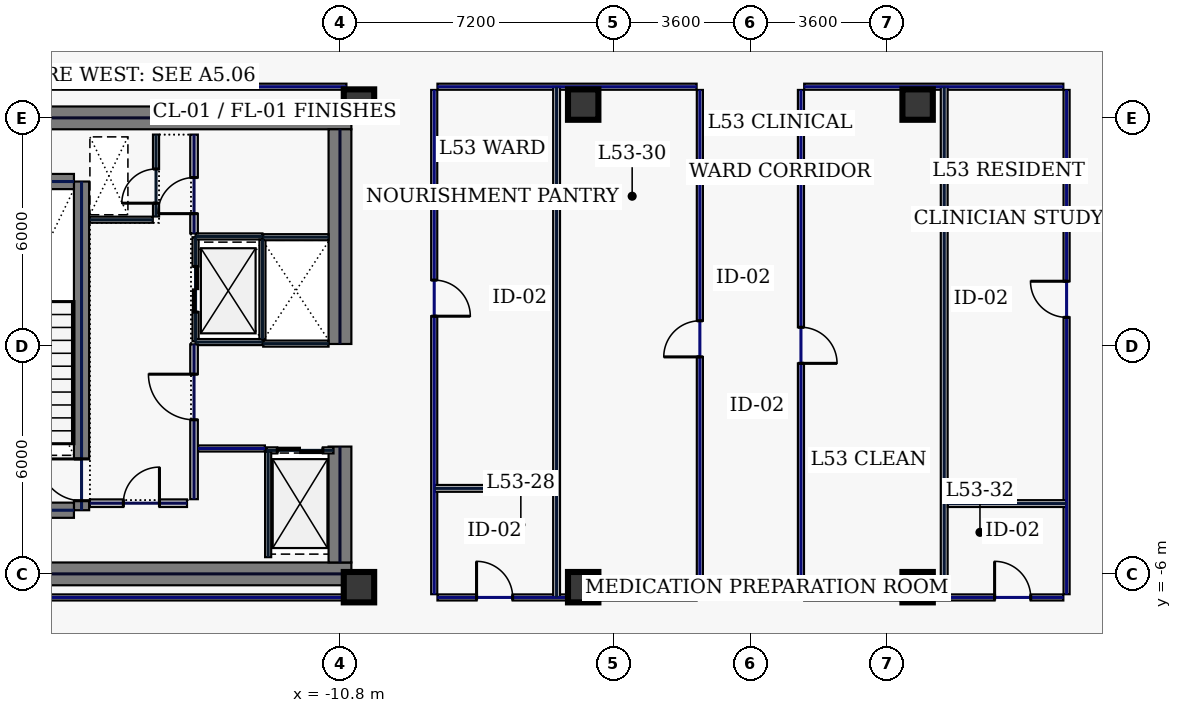
"""IFC4 building model, lengths in metres.
Left out: names, types, materials, properties, quantities, classifications, styles, units other than length and angle.
Written with IfcOpenShell. Run it as: python <this file> out.ifc"""

import sys

from ifc_helpers import new_model, si_unit, direction, frame, frame_2d, origin, origin_2d, place, context, subcontext, project, spatial, rectangle, hollow_rectangle, extrude, element, fill, save


model = new_model("IFC4")
c1 = context("Model", 3, precision=1e-05, world=origin(), true_north=direction((0.0, 1.0)))
c2 = subcontext(c1, "Body", "Model", "MODEL_VIEW")
j1 = project(units=[si_unit("LENGTHUNIT", "METRE"), si_unit("PLANEANGLEUNIT", "RADIAN")], contexts=[c1])
p1 = place(None, origin())
s1 = spatial("IfcSite", under=j1, at=p1, CompositionType="ELEMENT")
p2 = place(p1, origin())
s2 = spatial("IfcBuilding", under=s1, at=p2, CompositionType="ELEMENT")
p3 = place(p2, frame((0.0, 0.0, 230.2)))
s3 = spatial("IfcBuildingStorey", under=s2, at=p3, CompositionType="ELEMENT", Elevation=230.2)
for number, where, z_axis, x_axis in (
    (1, (-22.0, 6.0, 0.0), (0.0, 0.0, 1.0), (1.0, 0.0, 0.0)),
    (2, (-22.0, -6.0, 0.0), (0.0, 0.0, 1.0), (1.0, 0.0, 0.0)),
):
    element("IfcWall", number, at=place(p3, frame(where, z_axis=z_axis, x_axis=x_axis)), inside=s3, PredefinedType="SHEAR", context=c2, shape_type="SweptSolid", body=[
        extrude(rectangle(XDim=11.5, YDim=0.6, at=frame_2d((5.75, 0.0))), origin(), (0.0, 0.0, 1.0), 3.74),
    ])
p4 = place(p3, frame((-10.8, -5.7, 0.0), z_axis=(0.0, 0.0, 1.0), x_axis=(0.0, 1.0, 0.0)))
e3 = element("IfcWall", 3, at=p4, inside=s3, PredefinedType="SHEAR", context=c2, shape_type="SweptSolid", body=[
    extrude(rectangle(XDim=3.05, YDim=0.6, at=frame_2d((1.525, 0.0))), origin(), (0.0, 0.0, 1.0), 3.74),
])
p5 = place(p3, frame((-10.8, 0.05, 0.0), z_axis=(0.0, 0.0, 1.0), x_axis=(0.0, 1.0, 0.0)))
e4 = element("IfcWall", 4, at=p5, inside=s3, PredefinedType="SHEAR", context=c2, shape_type="SweptSolid", body=[
    extrude(rectangle(XDim=5.65, YDim=0.6, at=frame_2d((2.825, 0.0))), origin(), (0.0, 0.0, 1.0), 3.74),
])
p6 = place(p3, frame((-17.6, -4.325, 0.0), z_axis=(0.0, 0.0, 1.0), x_axis=(0.0, 1.0, 0.0)))
e5 = element("IfcWall", 5, at=p6, inside=s3, PredefinedType="SHEAR", context=c2, shape_type="SweptSolid", body=[
    extrude(rectangle(XDim=8.65, YDim=0.4, at=frame_2d((4.325, 0.0))), origin(), (0.0, 0.0, 1.0), 3.74),
])
p7 = place(p6, frame((0.25, 0.0, 0.0)))
e6 = element("IfcOpeningElement", 6, at=p7, cuts=e5, PredefinedType="OPENING", context=c2, shape_type="SweptSolid", body=[
    extrude(rectangle(XDim=1.1, YDim=2.2, at=frame_2d((0.55, 1.1))), frame((0.0, 0.21, 0.0), z_axis=(0.0, -1.0, 0.0), x_axis=(1.0, 0.0, 0.0)), (0.0, 0.0, 1.0), 0.42),
])
for number, where, z_axis, x_axis in (
    (7, (-21.2, -4.325, 0.0), (0.0, 0.0, 1.0), (1.0, 0.0, 0.0)),
    (8, (-21.2, 4.325, 0.0), (0.0, 0.0, 1.0), (1.0, 0.0, 0.0)),
):
    element("IfcWall", number, at=place(p3, frame(where, z_axis=z_axis, x_axis=x_axis)), inside=s3, PredefinedType="SHEAR", context=c2, shape_type="SweptSolid", body=[
        extrude(rectangle(XDim=3.4, YDim=0.4, at=frame_2d((1.7, 0.0))), origin(), (0.0, 0.0, 1.0), 3.74),
    ])
for number, where, z_axis, x_axis in (
    (9, (-10.3, -6.35, 0.0), (0.0, 0.0, 1.0), (1.0, 0.0, 0.0)),
    (10, (-10.3, 6.35, 0.0), (0.0, 0.0, 1.0), (1.0, 0.0, 0.0)),
    (11, (-4.4, -6.35, 0.0), (0.0, 0.0, 1.0), (1.0, 0.0, 0.0)),
    (12, (4.4, -6.35, 0.0), (0.0, 0.0, 1.0), (1.0, 0.0, 0.0)),
    (13, (-4.4, 6.35, 0.0), (0.0, 0.0, 1.0), (1.0, 0.0, 0.0)),
    (14, (4.4, 6.35, 0.0), (0.0, 0.0, 1.0), (1.0, 0.0, 0.0)),
):
    element("IfcColumn", number, at=place(p3, frame(where, z_axis=z_axis, x_axis=x_axis)), inside=s3, PredefinedType="COLUMN", context=c2, shape_type="SweptSolid", body=[
        extrude(hollow_rectangle(XDim=0.8, YDim=0.8, WallThickness=0.036, at=origin_2d()), origin(), (0.0, 0.0, 1.0), 3.74),
    ])
p8 = place(p3, frame((-14.6, 0.12, 0.0), z_axis=(0.0, 0.0, 1.0), x_axis=(0.0, 1.0, 0.0)))
e15 = element("IfcWall", 15, at=p8, inside=s3, PredefinedType="PARTITIONING", context=c2, shape_type="SweptSolid", body=[
    extrude(rectangle(XDim=2.74, YDim=0.16, at=frame_2d((1.37, 0.0))), origin(), (0.0, 0.0, 1.0), 3.74),
])
p9 = place(p8, frame((0.77, 0.0, 0.0)))
e16 = element("IfcOpeningElement", 16, at=p9, cuts=e15, PredefinedType="OPENING", context=c2, shape_type="SweptSolid", body=[
    extrude(rectangle(XDim=1.2, YDim=2.2, at=frame_2d((0.6, 1.1))), frame((0.0, 0.09, 0.0), z_axis=(0.0, -1.0, 0.0), x_axis=(1.0, 0.0, 0.0)), (0.0, 0.0, 1.0), 0.18),
])
for number, where, z_axis, x_axis in (
    (17, (-14.6, 0.1, 0.0), (0.0, 0.0, 1.0), (1.0, 0.0, 0.0)),
    (18, (-14.6, 2.88, 0.0), (0.0, 0.0, 1.0), (1.0, 0.0, 0.0)),
):
    element("IfcWall", number, at=place(p3, frame(where, z_axis=z_axis, x_axis=x_axis)), inside=s3, PredefinedType="PARTITIONING", context=c2, shape_type="SweptSolid", body=[
        extrude(rectangle(XDim=1.76, YDim=0.16, at=frame_2d((0.88, 0.0))), origin(), (0.0, 0.0, 1.0), 3.74),
    ])
p10 = place(p3, frame((-12.84, 0.18, 0.0), z_axis=(0.0, 0.0, 1.0), x_axis=(0.0, 1.0, 0.0)))
e19 = element("IfcWall", 19, at=p10, inside=s3, PredefinedType="PARTITIONING", context=c2, shape_type="SweptSolid", body=[
    extrude(rectangle(XDim=2.62, YDim=0.16, at=frame_2d((1.31, 0.0))), origin(), (0.0, 0.0, 1.0), 3.74),
])
p11 = place(p3, frame((-12.73, -2.75, 0.0), z_axis=(0.0, 0.0, 1.0), x_axis=(1.0, 0.0, 0.0)))
e20 = element("IfcWall", 20, at=p11, inside=s3, PredefinedType="PARTITIONING", context=c2, shape_type="SweptSolid", body=[
    extrude(rectangle(XDim=1.76, YDim=0.16, at=frame_2d((0.88, 0.0))), origin(), (0.0, 0.0, 1.0), 3.74),
])
p12 = place(p11, frame((0.28, 0.0, 0.0)))
e21 = element("IfcOpeningElement", 21, at=p12, cuts=e20, PredefinedType="OPENING", context=c2, shape_type="SweptSolid", body=[
    extrude(rectangle(XDim=1.2, YDim=2.2, at=frame_2d((0.6, 1.1))), frame((0.0, 0.09, 0.0), z_axis=(0.0, -1.0, 0.0), x_axis=(1.0, 0.0, 0.0)), (0.0, 0.0, 1.0), 0.18),
])
for number, where, z_axis, x_axis in (
    (22, (-12.82, 0.06, 0.0), (0.0, 0.0, 1.0), (1.0, 0.0, 0.0)),
    (23, (-12.82, 2.86, 0.0), (0.0, 0.0, 1.0), (1.0, 0.0, 0.0)),
):
    element("IfcWall", number, at=place(p3, frame(where, z_axis=z_axis, x_axis=x_axis)), inside=s3, PredefinedType="PARTITIONING", context=c2, shape_type="SweptSolid", body=[
        extrude(rectangle(XDim=1.72, YDim=0.16, at=frame_2d((0.86, 0.0))), origin(), (0.0, 0.0, 1.0), 3.74),
    ])
p13 = place(p3, frame((-15.64, 3.405, 0.0), z_axis=(0.0, 0.0, 1.0), x_axis=(0.0, 1.0, 0.0)))
e24 = element("IfcWall", 24, at=p13, inside=s3, PredefinedType="PARTITIONING", context=c2, shape_type="SweptSolid", body=[
    extrude(rectangle(XDim=2.155, YDim=0.16, at=frame_2d((1.078, 0.0))), origin(), (0.0, 0.0, 1.0), 3.74),
])
p14 = place(p13, frame((0.35, 0.0, 0.0)))
e25 = element("IfcOpeningElement", 25, at=p14, cuts=e24, PredefinedType="OPENING", context=c2, shape_type="SweptSolid", body=[
    extrude(rectangle(XDim=0.9, YDim=2.2, at=frame_2d((0.45, 1.1))), frame((0.0, 0.09, 0.0), z_axis=(0.0, -1.0, 0.0), x_axis=(1.0, 0.0, 0.0)), (0.0, 0.0, 1.0), 0.18),
])
p15 = place(p3, frame((-17.38, 3.32, 0.0), z_axis=(0.0, 0.0, 1.0), x_axis=(1.0, 0.0, 0.0)))
e26 = element("IfcWall", 26, at=p15, inside=s3, PredefinedType="PARTITIONING", context=c2, shape_type="SweptSolid", body=[
    extrude(rectangle(XDim=1.655, YDim=0.16, at=frame_2d((0.827, 0.0))), origin(), (0.0, 0.0, 1.0), 3.74),
])
p16 = place(p3, frame((-17.38, -4.14, 0.0), z_axis=(0.0, 0.0, 1.0), x_axis=(1.0, 0.0, 0.0)))
e27 = element("IfcWall", 27, at=p16, inside=s3, PredefinedType="SOLIDWALL", context=c2, shape_type="SweptSolid", body=[
    extrude(rectangle(XDim=2.555, YDim=0.2, at=frame_2d((1.277, 0.0))), origin(), (0.0, 0.0, 1.0), 3.74),
])
p17 = place(p16, frame((0.88, 0.0, 0.0)))
e28 = element("IfcOpeningElement", 28, at=p17, cuts=e27, PredefinedType="OPENING", context=c2, shape_type="SweptSolid", body=[
    extrude(rectangle(XDim=0.95, YDim=2.2, at=frame_2d((0.475, 1.1))), frame((0.0, 0.11, 0.0), z_axis=(0.0, -1.0, 0.0), x_axis=(1.0, 0.0, 0.0)), (0.0, 0.0, 1.0), 0.22),
])
p18 = place(p3, frame((-14.535, -2.7, 0.0), z_axis=(0.0, 0.0, 1.0), x_axis=(1.0, 0.0, 0.0)))
e29 = element("IfcWall", 29, at=p18, inside=s3, PredefinedType="PARTITIONING", context=c2, shape_type="SweptSolid", body=[
    extrude(rectangle(XDim=1.76, YDim=0.16, at=frame_2d((0.88, 0.0))), origin(), (0.0, 0.0, 1.0), 3.74),
])
p19 = place(p3, frame((-12.69, -5.56, 0.0), z_axis=(0.0, 0.0, 1.0), x_axis=(0.0, 1.0, 0.0)))
e30 = element("IfcWall", 30, at=p19, inside=s3, PredefinedType="PARTITIONING", context=c2, shape_type="SweptSolid", body=[
    extrude(rectangle(XDim=2.775, YDim=0.16, at=frame_2d((1.388, 0.0))), origin(), (0.0, 0.0, 1.0), 3.74),
])
p20 = place(p3, frame((-14.64, 2.96, 0.0), z_axis=(0.0, 0.0, 1.0), x_axis=(0.0, 1.0, 0.0)))
e31 = element("IfcWall", 31, at=p20, inside=s3, PredefinedType="SOLIDWALL", context=c2, shape_type="SweptSolid", body=[
    extrude(rectangle(XDim=2.6, YDim=0.2, at=frame_2d((1.3, 0.0))), origin(), (0.0, 0.0, 1.0), 3.74),
])
p21 = place(p20, frame((0.52, 0.0, 0.0)))
e32 = element("IfcOpeningElement", 32, at=p21, cuts=e31, PredefinedType="OPENING", context=c2, shape_type="SweptSolid", body=[
    extrude(rectangle(XDim=0.95, YDim=2.2, at=frame_2d((0.475, 1.1))), frame((0.0, 0.11, 0.0), z_axis=(0.0, -1.0, 0.0), x_axis=(1.0, 0.0, 0.0)), (0.0, 0.0, 1.0), 0.22),
])
p22 = place(p3, frame((-14.64, -4.035, 0.0), z_axis=(0.0, 0.0, 1.0), x_axis=(0.0, 1.0, 0.0)))
e33 = element("IfcWall", 33, at=p22, inside=s3, PredefinedType="SOLIDWALL", context=c2, shape_type="SweptSolid", body=[
    extrude(rectangle(XDim=4.075, YDim=0.2, at=frame_2d((2.038, 0.0))), origin(), (0.0, 0.0, 1.0), 3.74),
])
p23 = place(p22, frame((2.09, 0.0, 0.0)))
e34 = element("IfcOpeningElement", 34, at=p23, cuts=e33, PredefinedType="OPENING", context=c2, shape_type="SweptSolid", body=[
    extrude(rectangle(XDim=1.2, YDim=2.2, at=frame_2d((0.6, 1.1))), frame((0.0, 0.11, 0.0), z_axis=(0.0, -1.0, 0.0), x_axis=(1.0, 0.0, 0.0)), (0.0, 0.0, 1.0), 0.22),
])
for number, where, z_axis, x_axis in (
    (35, (-24.815, -6.62, 0.0), (0.0, 0.0, 1.0), (1.0, 0.0, 0.0)),
    (36, (-10.63, 6.82, 0.0), (0.0, 0.0, 1.0), (-1.0, 0.0, 0.0)),
):
    element("IfcWall", number, at=place(p3, frame(where, z_axis=z_axis, x_axis=x_axis)), inside=s3, PredefinedType="PARTITIONING", context=c2, shape_type="SweptSolid", body=[
        extrude(rectangle(XDim=14.185, YDim=0.16, at=frame_2d((7.093, 0.0))), origin(), (0.0, 0.0, 1.0), 3.74),
    ])
p24 = place(p3, frame((8.235, 6.82, 0.0), z_axis=(0.0, 0.0, 1.0), x_axis=(-1.0, 0.0, 0.0)))
e37 = element("IfcWall", 37, at=p24, inside=s3, PredefinedType="PARTITIONING", context=c2, shape_type="SweptSolid", body=[
    extrude(rectangle(XDim=6.82, YDim=0.16, at=frame_2d((3.41, 0.0))), origin(), (0.0, 0.0, 1.0), 3.74),
])
p25 = place(p3, frame((1.33, 6.735, 0.0), z_axis=(0.0, 0.0, 1.0), x_axis=(0.0, -1.0, 0.0)))
e38 = element("IfcWall", 38, at=p25, inside=s3, PredefinedType="PARTITIONING", context=c2, shape_type="SweptSolid", body=[
    extrude(rectangle(XDim=13.27, YDim=0.16, at=frame_2d((6.635, 0.0))), origin(), (0.0, 0.0, 1.0), 3.74),
])
p26 = place(p25, frame((6.245, 0.0, 0.0)))
e39 = element("IfcOpeningElement", 39, at=p26, cuts=e38, PredefinedType="OPENING", context=c2, shape_type="SweptSolid", body=[
    extrude(rectangle(XDim=0.95, YDim=2.2, at=frame_2d((0.475, 1.1))), frame((0.0, 0.09, 0.0), z_axis=(0.0, -1.0, 0.0), x_axis=(1.0, 0.0, 0.0)), (0.0, 0.0, 1.0), 0.18),
])
p27 = place(p3, frame((1.415, -6.62, 0.0), z_axis=(0.0, 0.0, 1.0), x_axis=(1.0, 0.0, 0.0)))
e40 = element("IfcWall", 40, at=p27, inside=s3, PredefinedType="PARTITIONING", context=c2, shape_type="SweptSolid", body=[
    extrude(rectangle(XDim=6.82, YDim=0.16, at=frame_2d((3.41, 0.0))), origin(), (0.0, 0.0, 1.0), 3.74),
])
p28 = place(p27, frame((5.011, 0.0, 0.0)))
e41 = element("IfcOpeningElement", 41, at=p28, cuts=e40, PredefinedType="OPENING", context=c2, shape_type="SweptSolid", body=[
    extrude(rectangle(XDim=0.95, YDim=2.2, at=frame_2d((0.475, 1.1))), frame((0.0, 0.09, 0.0), z_axis=(0.0, -1.0, 0.0), x_axis=(1.0, 0.0, 0.0)), (0.0, 0.0, 1.0), 0.18),
])
p29 = place(p3, frame((8.32, -6.535, 0.0), z_axis=(0.0, 0.0, 1.0), x_axis=(0.0, 1.0, 0.0)))
e42 = element("IfcWall", 42, at=p29, inside=s3, PredefinedType="PARTITIONING", context=c2, shape_type="SweptSolid", body=[
    extrude(rectangle(XDim=13.27, YDim=0.16, at=frame_2d((6.635, 0.0))), origin(), (0.0, 0.0, 1.0), 3.74),
])
p30 = place(p29, frame((7.286, 0.0, 0.0)))
e43 = element("IfcOpeningElement", 43, at=p30, cuts=e42, PredefinedType="OPENING", context=c2, shape_type="SweptSolid", body=[
    extrude(rectangle(XDim=0.95, YDim=2.2, at=frame_2d((0.475, 1.1))), frame((0.0, 0.09, 0.0), z_axis=(0.0, -1.0, 0.0), x_axis=(1.0, 0.0, 0.0)), (0.0, 0.0, 1.0), 0.18),
])
p31 = place(p3, frame((-1.33, -6.535, 0.0), z_axis=(0.0, 0.0, 1.0), x_axis=(0.0, 1.0, 0.0)))
e44 = element("IfcWall", 44, at=p31, inside=s3, PredefinedType="PARTITIONING", context=c2, shape_type="SweptSolid", body=[
    extrude(rectangle(XDim=13.27, YDim=0.16, at=frame_2d((6.635, 0.0))), origin(), (0.0, 0.0, 1.0), 3.74),
])
p32 = place(p31, frame((6.245, 0.0, 0.0)))
e45 = element("IfcOpeningElement", 45, at=p32, cuts=e44, PredefinedType="OPENING", context=c2, shape_type="SweptSolid", body=[
    extrude(rectangle(XDim=0.95, YDim=2.2, at=frame_2d((0.475, 1.1))), frame((0.0, 0.09, 0.0), z_axis=(0.0, -1.0, 0.0), x_axis=(1.0, 0.0, 0.0)), (0.0, 0.0, 1.0), 0.18),
])
p33 = place(p3, frame((-1.415, 6.82, 0.0), z_axis=(0.0, 0.0, 1.0), x_axis=(-1.0, 0.0, 0.0)))
e46 = element("IfcWall", 46, at=p33, inside=s3, PredefinedType="PARTITIONING", context=c2, shape_type="SweptSolid", body=[
    extrude(rectangle(XDim=6.82, YDim=0.16, at=frame_2d((3.41, 0.0))), origin(), (0.0, 0.0, 1.0), 3.74),
])
p34 = place(p3, frame((-8.32, 6.735, 0.0), z_axis=(0.0, 0.0, 1.0), x_axis=(0.0, -1.0, 0.0)))
e47 = element("IfcWall", 47, at=p34, inside=s3, PredefinedType="PARTITIONING", context=c2, shape_type="SweptSolid", body=[
    extrude(rectangle(XDim=13.27, YDim=0.16, at=frame_2d((6.635, 0.0))), origin(), (0.0, 0.0, 1.0), 3.74),
])
p35 = place(p34, frame((5.004, 0.0, 0.0)))
e48 = element("IfcOpeningElement", 48, at=p35, cuts=e47, PredefinedType="OPENING", context=c2, shape_type="SweptSolid", body=[
    extrude(rectangle(XDim=0.95, YDim=2.2, at=frame_2d((0.475, 1.1))), frame((0.0, 0.09, 0.0), z_axis=(0.0, -1.0, 0.0), x_axis=(1.0, 0.0, 0.0)), (0.0, 0.0, 1.0), 0.18),
])
p36 = place(p3, frame((-8.235, -6.62, 0.0), z_axis=(0.0, 0.0, 1.0), x_axis=(1.0, 0.0, 0.0)))
e49 = element("IfcWall", 49, at=p36, inside=s3, PredefinedType="PARTITIONING", context=c2, shape_type="SweptSolid", body=[
    extrude(rectangle(XDim=6.82, YDim=0.16, at=frame_2d((3.41, 0.0))), origin(), (0.0, 0.0, 1.0), 3.74),
])
p37 = place(p36, frame((1.029, 0.0, 0.0)))
e50 = element("IfcOpeningElement", 50, at=p37, cuts=e49, PredefinedType="OPENING", context=c2, shape_type="SweptSolid", body=[
    extrude(rectangle(XDim=0.95, YDim=2.2, at=frame_2d((0.475, 1.1))), frame((0.0, 0.09, 0.0), z_axis=(0.0, -1.0, 0.0), x_axis=(1.0, 0.0, 0.0)), (0.0, 0.0, 1.0), 0.18),
])
for number, where, z_axis, x_axis in (
    (51, (-5.1, -6.615, 0.0), (0.0, 0.0, 1.0), (0.0, 1.0, 0.0)),
    (52, (5.1, -6.615, 0.0), (0.0, 0.0, 1.0), (0.0, 1.0, 0.0)),
):
    element("IfcWall", number, at=place(p3, frame(where, z_axis=z_axis, x_axis=x_axis)), inside=s3, PredefinedType="PARTITIONING", context=c2, shape_type="SweptSolid", body=[
        extrude(rectangle(XDim=13.43, YDim=0.18, at=frame_2d((6.715, 0.0))), origin(), (0.0, 0.0, 1.0), 3.74),
    ])
for number, where, z_axis, x_axis in (
    (53, (-8.315, -3.75, 0.0), (0.0, 0.0, 1.0), (1.0, 0.0, 0.0)),
    (54, (5.195, -4.15, 0.0), (0.0, 0.0, 1.0), (1.0, 0.0, 0.0)),
):
    element("IfcWall", number, at=place(p3, frame(where, z_axis=z_axis, x_axis=x_axis)), inside=s3, PredefinedType="PARTITIONING", context=c2, shape_type="SweptSolid", body=[
        extrude(rectangle(XDim=3.12, YDim=0.18, at=frame_2d((1.56, 0.0))), origin(), (0.0, 0.0, 1.0), 3.74),
    ])
p38 = place(p7, origin())
e55 = element("IfcDoor", 55, at=p38, inside=s3, OperationType="SINGLE_SWING_RIGHT", PredefinedType="DOOR", context=c2, shape_type="SweptSolid", body=[
    extrude(rectangle(XDim=1.1, YDim=2.2, at=frame_2d((0.55, 1.1))), frame((0.0, 0.025, 0.0), z_axis=(0.0, -1.0, 0.0), x_axis=(1.0, 0.0, 0.0)), (0.0, 0.0, 1.0), 0.05),
])
fill(e6, e55)
p39 = place(p9, origin())
e56 = element("IfcDoor", 56, at=p39, inside=s3, OperationType="SLIDING_TO_LEFT", PredefinedType="DOOR", context=c2, shape_type="SweptSolid", body=[
    extrude(rectangle(XDim=1.2, YDim=2.2, at=frame_2d((0.6, 1.1))), frame((0.0, 0.025, 0.0), z_axis=(0.0, -1.0, 0.0), x_axis=(1.0, 0.0, 0.0)), (0.0, 0.0, 1.0), 0.05),
])
fill(e16, e56)
p40 = place(p12, origin())
e57 = element("IfcDoor", 57, at=p40, inside=s3, OperationType="SLIDING_TO_LEFT", PredefinedType="DOOR", context=c2, shape_type="SweptSolid", body=[
    extrude(rectangle(XDim=1.2, YDim=2.2, at=frame_2d((0.6, 1.1))), frame((0.0, 0.025, 0.0), z_axis=(0.0, -1.0, 0.0), x_axis=(1.0, 0.0, 0.0)), (0.0, 0.0, 1.0), 0.05),
])
fill(e21, e57)
p41 = place(p14, origin())
e58 = element("IfcDoor", 58, at=p41, inside=s3, OperationType="SINGLE_SWING_LEFT", PredefinedType="DOOR", context=c2, shape_type="SweptSolid", body=[
    extrude(rectangle(XDim=0.9, YDim=2.2, at=frame_2d((0.45, 1.1))), frame((0.0, 0.025, 0.0), z_axis=(0.0, -1.0, 0.0), x_axis=(1.0, 0.0, 0.0)), (0.0, 0.0, 1.0), 0.05),
])
fill(e25, e58)
p42 = place(p17, origin())
e59 = element("IfcDoor", 59, at=p42, inside=s3, OperationType="SINGLE_SWING_RIGHT", PredefinedType="DOOR", context=c2, shape_type="SweptSolid", body=[
    extrude(rectangle(XDim=0.95, YDim=2.2, at=frame_2d((0.475, 1.1))), frame((0.0, 0.025, 0.0), z_axis=(0.0, -1.0, 0.0), x_axis=(1.0, 0.0, 0.0)), (0.0, 0.0, 1.0), 0.05),
])
fill(e28, e59)
p43 = place(p21, origin())
e60 = element("IfcDoor", 60, at=p43, inside=s3, OperationType="SINGLE_SWING_LEFT", PredefinedType="DOOR", context=c2, shape_type="SweptSolid", body=[
    extrude(rectangle(XDim=0.95, YDim=2.2, at=frame_2d((0.475, 1.1))), frame((0.0, 0.025, 0.0), z_axis=(0.0, -1.0, 0.0), x_axis=(1.0, 0.0, 0.0)), (0.0, 0.0, 1.0), 0.05),
])
fill(e32, e60)
p44 = place(p23, origin())
e61 = element("IfcDoor", 61, at=p44, inside=s3, OperationType="SINGLE_SWING_RIGHT", PredefinedType="DOOR", context=c2, shape_type="SweptSolid", body=[
    extrude(rectangle(XDim=1.2, YDim=2.2, at=frame_2d((0.6, 1.1))), frame((0.0, 0.025, 0.0), z_axis=(0.0, -1.0, 0.0), x_axis=(1.0, 0.0, 0.0)), (0.0, 0.0, 1.0), 0.05),
])
fill(e34, e61)
p45 = place(p37, origin())
e62 = element("IfcDoor", 62, at=p45, inside=s3, OperationType="SINGLE_SWING_LEFT", PredefinedType="DOOR", context=c2, shape_type="SweptSolid", body=[
    extrude(rectangle(XDim=0.95, YDim=2.2, at=frame_2d((0.475, 1.1))), frame((0.0, 0.025, 0.0), z_axis=(0.0, -1.0, 0.0), x_axis=(1.0, 0.0, 0.0)), (0.0, 0.0, 1.0), 0.05),
])
fill(e50, e62)
p46 = place(p35, origin())
e63 = element("IfcDoor", 63, at=p46, inside=s3, OperationType="SINGLE_SWING_RIGHT", PredefinedType="DOOR", context=c2, shape_type="SweptSolid", body=[
    extrude(rectangle(XDim=0.95, YDim=2.2, at=frame_2d((0.475, 1.1))), frame((0.0, 0.025, 0.0), z_axis=(0.0, -1.0, 0.0), x_axis=(1.0, 0.0, 0.0)), (0.0, 0.0, 1.0), 0.05),
])
fill(e48, e63)
p47 = place(p32, origin())
e64 = element("IfcDoor", 64, at=p47, inside=s3, OperationType="SINGLE_SWING_LEFT", PredefinedType="DOOR", context=c2, shape_type="SweptSolid", body=[
    extrude(rectangle(XDim=0.95, YDim=2.2, at=frame_2d((0.475, 1.1))), frame((0.0, 0.025, 0.0), z_axis=(0.0, -1.0, 0.0), x_axis=(1.0, 0.0, 0.0)), (0.0, 0.0, 1.0), 0.05),
])
fill(e45, e64)
p48 = place(p26, origin())
e65 = element("IfcDoor", 65, at=p48, inside=s3, OperationType="SINGLE_SWING_RIGHT", PredefinedType="DOOR", context=c2, shape_type="SweptSolid", body=[
    extrude(rectangle(XDim=0.95, YDim=2.2, at=frame_2d((0.475, 1.1))), frame((0.0, 0.025, 0.0), z_axis=(0.0, -1.0, 0.0), x_axis=(1.0, 0.0, 0.0)), (0.0, 0.0, 1.0), 0.05),
])
fill(e39, e65)
p49 = place(p28, origin())
e66 = element("IfcDoor", 66, at=p49, inside=s3, OperationType="SINGLE_SWING_LEFT", PredefinedType="DOOR", context=c2, shape_type="SweptSolid", body=[
    extrude(rectangle(XDim=0.95, YDim=2.2, at=frame_2d((0.475, 1.1))), frame((0.0, 0.025, 0.0), z_axis=(0.0, -1.0, 0.0), x_axis=(1.0, 0.0, 0.0)), (0.0, 0.0, 1.0), 0.05),
])
fill(e41, e66)
p50 = place(p30, origin())
e67 = element("IfcDoor", 67, at=p50, inside=s3, OperationType="SINGLE_SWING_RIGHT", PredefinedType="DOOR", context=c2, shape_type="SweptSolid", body=[
    extrude(rectangle(XDim=0.95, YDim=2.2, at=frame_2d((0.475, 1.1))), frame((0.0, 0.025, 0.0), z_axis=(0.0, -1.0, 0.0), x_axis=(1.0, 0.0, 0.0)), (0.0, 0.0, 1.0), 0.05),
])
fill(e43, e67)
save(model, sys.argv[1])
